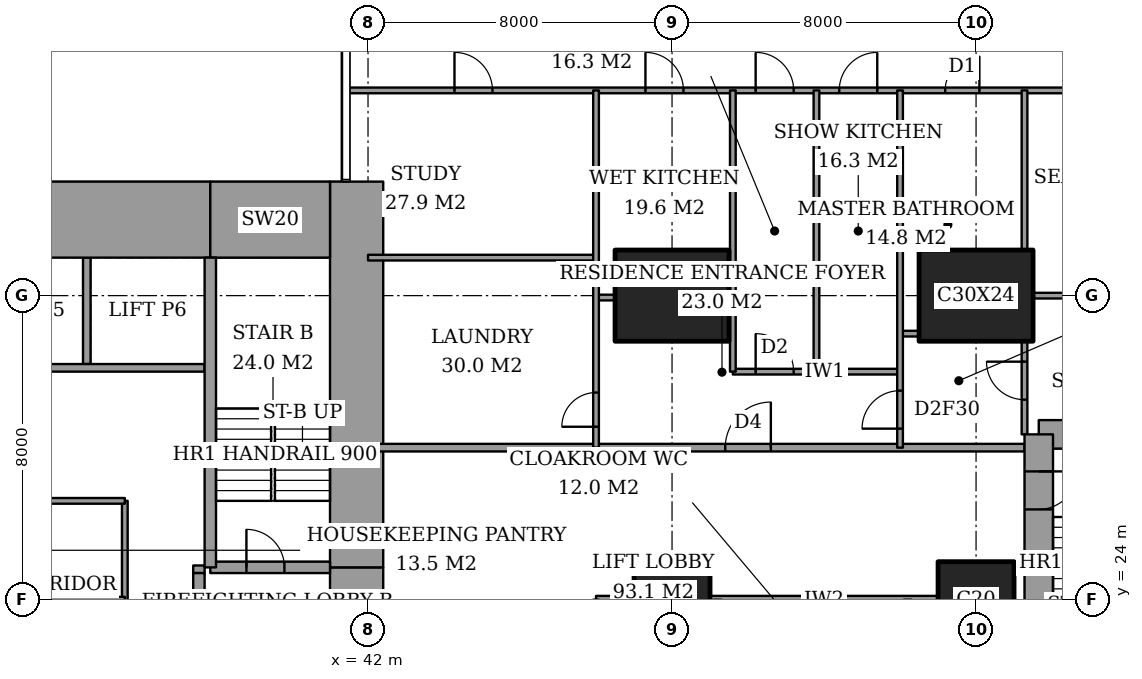
"""IFC4 building model, lengths in metres.
Left out: names, types, materials, properties, quantities, classifications, styles, units other than length and angle.
Written with IfcOpenShell. Run it as: python <this file> out.ifc"""

import sys

from ifc_helpers import new_model, si_unit, direction, frame, frame_2d, origin, origin_2d, place, context, subcontext, project, spatial, rectangle, extrude, element, fill, save


model = new_model("IFC4")
c1 = context("Model", 3, precision=1e-05, world=origin(), true_north=direction((0.0, 1.0)))
c2 = subcontext(c1, "Body", "Model", "MODEL_VIEW")
j1 = project(units=[si_unit("LENGTHUNIT", "METRE"), si_unit("PLANEANGLEUNIT", "RADIAN")], contexts=[c1])
p1 = place(None, origin())
s1 = spatial("IfcSite", under=j1, at=p1, CompositionType="ELEMENT")
p2 = place(p1, origin())
s2 = spatial("IfcBuilding", under=s1, at=p2, CompositionType="ELEMENT")
p3 = place(p2, frame((0.0, 0.0, 40.4)))
s3 = spatial("IfcBuildingStorey", under=s2, at=p3, CompositionType="ELEMENT", Elevation=40.4)
p4 = place(p3, frame((50.0, 24.0, 0.0), z_axis=(0.0, 0.0, 1.0), x_axis=(1.0, 0.0, 0.0)))
e1 = element("IfcColumn", 1, at=p4, inside=s3, PredefinedType="COLUMN", context=c2, shape_type="SweptSolid", body=[
    extrude(rectangle(XDim=2.0, YDim=2.0, at=origin_2d()), origin(), (0.0, 0.0, 1.0), 3.6),
])
p5 = place(p3, frame((50.0, 32.0, 0.0), z_axis=(0.0, 0.0, 1.0), x_axis=(1.0, 0.0, 0.0)))
e2 = element("IfcColumn", 2, at=p5, inside=s3, PredefinedType="COLUMN", context=c2, shape_type="SweptSolid", body=[
    extrude(rectangle(XDim=3.0, YDim=2.4, at=origin_2d()), origin(), (0.0, 0.0, 1.0), 3.6),
])
p6 = place(p3, frame((58.0, 24.0, 0.0), z_axis=(0.0, 0.0, 1.0), x_axis=(1.0, 0.0, 0.0)))
e3 = element("IfcColumn", 3, at=p6, inside=s3, PredefinedType="COLUMN", context=c2, shape_type="SweptSolid", body=[
    extrude(rectangle(XDim=2.0, YDim=2.0, at=origin_2d()), origin(), (0.0, 0.0, 1.0), 3.6),
])
p7 = place(p3, frame((58.0, 32.0, 0.0), z_axis=(0.0, 0.0, 1.0), x_axis=(1.0, 0.0, 0.0)))
e4 = element("IfcColumn", 4, at=p7, inside=s3, PredefinedType="COLUMN", context=c2, shape_type="SweptSolid", body=[
    extrude(rectangle(XDim=3.0, YDim=2.4, at=origin_2d()), origin(), (0.0, 0.0, 1.0), 3.6),
])
p8 = place(p3, frame((28.15, 34.0, 0.0), z_axis=(0.0, 0.0, 1.0), x_axis=(1.0, 0.0, 0.0)))
e5 = element("IfcWall", 5, at=p8, inside=s3, PredefinedType="SHEAR", context=c2, shape_type="SweptSolid", body=[
    extrude(rectangle(XDim=9.7, YDim=2.0, at=frame_2d((4.85, 0.0))), origin(), (0.0, 0.0, 1.0), 3.6),
])
p9 = place(p3, frame((37.85, 34.0, 0.0), z_axis=(0.0, 0.0, 1.0), x_axis=(1.0, 0.0, 0.0)))
e6 = element("IfcWall", 6, at=p9, inside=s3, PredefinedType="SHEAR", context=c2, shape_type="SweptSolid", body=[
    extrude(rectangle(XDim=3.15, YDim=2.0, at=frame_2d((1.575, 0.0))), origin(), (0.0, 0.0, 1.0), 3.6),
])
p10 = place(p3, frame((41.7, 13.0, 0.0), z_axis=(0.0, 0.0, 1.0), x_axis=(0.0, 1.0, 0.0)))
e7 = element("IfcWall", 7, at=p10, inside=s3, PredefinedType="SHEAR", context=c2, shape_type="SweptSolid", body=[
    extrude(rectangle(XDim=11.85, YDim=1.4, at=frame_2d((5.925, 0.0))), origin(), (0.0, 0.0, 1.0), 3.6),
])
p11 = place(p10, frame((7.5, 0.0, 0.0)))
e8 = element("IfcOpeningElement", 8, at=p11, cuts=e7, PredefinedType="OPENING", context=c2, shape_type="SweptSolid", body=[
    extrude(rectangle(XDim=1.8, YDim=2.4, at=frame_2d((0.9, 1.2))), frame((0.0, 0.71, 0.0), z_axis=(0.0, -1.0, 0.0), x_axis=(1.0, 0.0, 0.0)), (0.0, 0.0, 1.0), 1.42),
])
p12 = place(p3, frame((41.7, 24.85, 0.0), z_axis=(0.0, 0.0, 1.0), x_axis=(0.0, 1.0, 0.0)))
e9 = element("IfcWall", 9, at=p12, inside=s3, PredefinedType="SHEAR", context=c2, shape_type="SweptSolid", body=[
    extrude(rectangle(XDim=10.15, YDim=1.4, at=frame_2d((5.075, 0.0))), origin(), (0.0, 0.0, 1.0), 3.6),
])
p13 = place(p3, frame((37.85, 24.85, 0.0), z_axis=(0.0, 0.0, 1.0), x_axis=(0.0, 1.0, 0.0)))
e10 = element("IfcWall", 10, at=p13, inside=s3, PredefinedType="SHEAR", context=c2, shape_type="SweptSolid", body=[
    extrude(rectangle(XDim=8.15, YDim=0.3, at=frame_2d((4.075, 0.0))), origin(), (0.0, 0.0, 1.0), 3.6),
])
p14 = place(p3, frame((37.85, 24.85, 0.0), z_axis=(0.0, 0.0, 1.0), x_axis=(1.0, 0.0, 0.0)))
e11 = element("IfcWall", 11, at=p14, inside=s3, PredefinedType="SHEAR", context=c2, shape_type="SweptSolid", body=[
    extrude(rectangle(XDim=3.15, YDim=0.3, at=frame_2d((1.575, 0.0))), origin(), (0.0, 0.0, 1.0), 3.6),
])
p15 = place(p14, frame((0.95, 0.0, 0.0)))
e12 = element("IfcOpeningElement", 12, at=p15, cuts=e11, PredefinedType="OPENING", context=c2, shape_type="SweptSolid", body=[
    extrude(rectangle(XDim=1.0, YDim=2.1, at=frame_2d((0.5, 1.05))), frame((0.0, 0.16, 0.0), z_axis=(0.0, -1.0, 0.0), x_axis=(1.0, 0.0, 0.0)), (0.0, 0.0, 1.0), 0.32),
])
p16 = place(p3, frame((37.55, 18.0, 0.0), z_axis=(0.0, 0.0, 1.0), x_axis=(0.0, 1.0, 0.0)))
e13 = element("IfcWall", 13, at=p16, inside=s3, PredefinedType="PARTITIONING", context=c2, shape_type="SweptSolid", body=[
    extrude(rectangle(XDim=6.7, YDim=0.3, at=frame_2d((3.35, 0.0))), origin(), (0.0, 0.0, 1.0), 3.6),
])
p17 = place(p16, frame((2.8, 0.0, 0.0)))
e14 = element("IfcOpeningElement", 14, at=p17, cuts=e13, PredefinedType="OPENING", context=c2, shape_type="SweptSolid", body=[
    extrude(rectangle(XDim=1.2, YDim=2.1, at=frame_2d((0.6, 1.05))), frame((0.0, 0.16, 0.0), z_axis=(0.0, -1.0, 0.0), x_axis=(1.0, 0.0, 0.0)), (0.0, 0.0, 1.0), 0.32),
])
p18 = place(p3, frame((64.1, 28.35, 0.0), z_axis=(0.0, 0.0, 1.0), x_axis=(-1.0, 0.0, 0.0)))
e15 = element("IfcWall", 15, at=p18, inside=s3, PredefinedType="SHEAR", context=c2, shape_type="SweptSolid", body=[
    extrude(rectangle(XDim=4.45, YDim=0.75, at=frame_2d((2.225, 0.0))), origin(), (0.0, 0.0, 1.0), 3.6),
])
p19 = place(p3, frame((59.65, 28.35, 0.0), z_axis=(0.0, 0.0, 1.0), x_axis=(0.0, -1.0, 0.0)))
e16 = element("IfcWall", 16, at=p19, inside=s3, PredefinedType="SHEAR", context=c2, shape_type="SweptSolid", body=[
    extrude(rectangle(XDim=8.7, YDim=0.75, at=frame_2d((4.35, 0.0))), origin(), (0.0, 0.0, 1.0), 3.6),
])
p20 = place(p19, frame((0.975, 0.0, 0.0)))
e17 = element("IfcOpeningElement", 17, at=p20, cuts=e16, PredefinedType="OPENING", context=c2, shape_type="SweptSolid", body=[
    extrude(rectangle(XDim=1.0, YDim=2.1, at=frame_2d((0.5, 1.05))), frame((0.0, 0.385, 0.0), z_axis=(0.0, -1.0, 0.0), x_axis=(1.0, 0.0, 0.0)), (0.0, 0.0, 1.0), 0.77),
])
p21 = place(p3, frame((48.0, 24.0, 0.0), z_axis=(0.0, 0.0, 1.0), x_axis=(1.0, 0.0, 0.0)))
e18 = element("IfcWall", 18, at=p21, inside=s3, PredefinedType="PARTITIONING", context=c2, shape_type="SweptSolid", body=[
    extrude(rectangle(XDim=1.0, YDim=0.2, at=frame_2d((0.5, 0.0))), origin(), (0.0, 0.0, 1.0), 3.35),
])
p22 = place(p3, frame((51.0, 24.0, 0.0), z_axis=(0.0, 0.0, 1.0), x_axis=(1.0, 0.0, 0.0)))
e19 = element("IfcWall", 19, at=p22, inside=s3, PredefinedType="PARTITIONING", context=c2, shape_type="SweptSolid", body=[
    extrude(rectangle(XDim=6.0, YDim=0.2, at=frame_2d((3.0, 0.0))), origin(), (0.0, 0.0, 1.0), 3.35),
])
p23 = place(p3, frame((42.0, 28.0, 0.0), z_axis=(0.0, 0.0, 1.0), x_axis=(1.0, 0.0, 0.0)))
e20 = element("IfcWall", 20, at=p23, inside=s3, PredefinedType="PARTITIONING", context=c2, shape_type="SweptSolid", body=[
    extrude(rectangle(XDim=17.275, YDim=0.2, at=frame_2d((8.637, 0.0))), origin(), (0.0, 0.0, 1.0), 3.35),
])
p24 = place(p23, frame((9.4, 0.0, 0.0)))
e21 = element("IfcOpeningElement", 21, at=p24, cuts=e20, PredefinedType="OPENING", context=c2, shape_type="SweptSolid", body=[
    extrude(rectangle(XDim=1.2, YDim=2.4, at=frame_2d((0.6, 1.2))), frame((0.0, 0.11, 0.0), z_axis=(0.0, -1.0, 0.0), x_axis=(1.0, 0.0, 0.0)), (0.0, 0.0, 1.0), 0.22),
])
p25 = place(p3, frame((51.6, 30.0, 0.0), z_axis=(0.0, 0.0, 1.0), x_axis=(1.0, 0.0, 0.0)))
e22 = element("IfcWall", 22, at=p25, inside=s3, PredefinedType="PARTITIONING", context=c2, shape_type="SweptSolid", body=[
    extrude(rectangle(XDim=4.4, YDim=0.15, at=frame_2d((2.2, 0.0))), origin(), (0.0, 0.0, 1.0), 3.35),
])
p26 = place(p25, frame((0.6, 0.0, 0.0)))
e23 = element("IfcOpeningElement", 23, at=p26, cuts=e22, PredefinedType="OPENING", context=c2, shape_type="SweptSolid", body=[
    extrude(rectangle(XDim=1.0, YDim=2.1, at=frame_2d((0.5, 1.05))), frame((0.0, 0.085, 0.0), z_axis=(0.0, -1.0, 0.0), x_axis=(1.0, 0.0, 0.0)), (0.0, 0.0, 1.0), 0.17),
])
p27 = place(p3, frame((56.0, 31.0, 0.0), z_axis=(0.0, 0.0, 1.0), x_axis=(1.0, 0.0, 0.0)))
e24 = element("IfcWall", 24, at=p27, inside=s3, PredefinedType="PARTITIONING", context=c2, shape_type="SweptSolid", body=[
    extrude(rectangle(XDim=0.5, YDim=0.15, at=frame_2d((0.25, 0.0))), origin(), (0.0, 0.0, 1.0), 3.35),
])
p28 = place(p3, frame((48.0, 31.95, 0.0), z_axis=(0.0, 0.0, 1.0), x_axis=(1.0, 0.0, 0.0)))
e25 = element("IfcWall", 25, at=p28, inside=s3, PredefinedType="PARTITIONING", context=c2, shape_type="SweptSolid", body=[
    extrude(rectangle(XDim=0.5, YDim=0.15, at=frame_2d((0.25, 0.0))), origin(), (0.0, 0.0, 1.0), 2.634),
])
p29 = place(p3, frame((59.5, 32.0, 0.0), z_axis=(0.0, 0.0, 1.0), x_axis=(1.0, 0.0, 0.0)))
e26 = element("IfcWall", 26, at=p29, inside=s3, PredefinedType="PARTITIONING", context=c2, shape_type="SweptSolid", body=[
    extrude(rectangle(XDim=5.15, YDim=0.15, at=frame_2d((2.575, 0.0))), origin(), (0.0, 0.0, 1.0), 2.634),
])
p30 = place(p3, frame((42.0, 33.0, 0.0), z_axis=(0.0, 0.0, 1.0), x_axis=(1.0, 0.0, 0.0)))
e27 = element("IfcWall", 27, at=p30, inside=s3, PredefinedType="PARTITIONING", context=c2, shape_type="SweptSolid", body=[
    extrude(rectangle(XDim=6.0, YDim=0.15, at=frame_2d((3.0, 0.0))), origin(), (0.0, 0.0, 1.0), 3.35),
])
p31 = place(p3, frame((41.439, 37.4, 0.0), z_axis=(0.0, 0.0, 1.0), x_axis=(1.0, 0.0, 0.0)))
e28 = element("IfcWall", 28, at=p31, inside=s3, PredefinedType="PARTITIONING", context=c2, shape_type="SweptSolid", body=[
    extrude(rectangle(XDim=25.011, YDim=0.15, at=frame_2d((12.505, 0.0))), origin(), (0.0, 0.0, 1.0), 3.35),
])
p32 = place(p31, frame((10.761, 0.0, 0.0)))
e29 = element("IfcOpeningElement", 29, at=p32, cuts=e28, PredefinedType="OPENING", context=c2, shape_type="SweptSolid", body=[
    extrude(rectangle(XDim=1.0, YDim=2.1, at=frame_2d((0.5, 1.05))), frame((0.0, 0.085, 0.0), z_axis=(0.0, -1.0, 0.0), x_axis=(1.0, 0.0, 0.0)), (0.0, 0.0, 1.0), 0.17),
])
p33 = place(p31, frame((20.924, 0.0, 0.0)))
e30 = element("IfcOpeningElement", 30, at=p33, cuts=e28, PredefinedType="OPENING", context=c2, shape_type="SweptSolid", body=[
    extrude(rectangle(XDim=1.0, YDim=2.1, at=frame_2d((0.5, 1.05))), frame((0.0, 0.085, 0.0), z_axis=(0.0, -1.0, 0.0), x_axis=(1.0, 0.0, 0.0)), (0.0, 0.0, 1.0), 0.17),
])
p34 = place(p31, frame((15.749, 0.0, 0.0)))
e31 = element("IfcOpeningElement", 31, at=p34, cuts=e28, PredefinedType="OPENING", context=c2, shape_type="SweptSolid", body=[
    extrude(rectangle(XDim=0.9, YDim=2.1, at=frame_2d((0.45, 1.05))), frame((0.0, 0.085, 0.0), z_axis=(0.0, -1.0, 0.0), x_axis=(1.0, 0.0, 0.0)), (0.0, 0.0, 1.0), 0.17),
])
p35 = place(p31, frame((12.961, 0.0, 0.0)))
e32 = element("IfcOpeningElement", 32, at=p35, cuts=e28, PredefinedType="OPENING", context=c2, shape_type="SweptSolid", body=[
    extrude(rectangle(XDim=1.0, YDim=2.1, at=frame_2d((0.5, 1.05))), frame((0.0, 0.085, 0.0), z_axis=(0.0, -1.0, 0.0), x_axis=(1.0, 0.0, 0.0)), (0.0, 0.0, 1.0), 0.17),
])
p36 = place(p31, frame((7.861, 0.0, 0.0)))
e33 = element("IfcOpeningElement", 33, at=p36, cuts=e28, PredefinedType="OPENING", context=c2, shape_type="SweptSolid", body=[
    extrude(rectangle(XDim=1.0, YDim=2.1, at=frame_2d((0.5, 1.05))), frame((0.0, 0.085, 0.0), z_axis=(0.0, -1.0, 0.0), x_axis=(1.0, 0.0, 0.0)), (0.0, 0.0, 1.0), 0.17),
])
p37 = place(p31, frame((2.836, 0.0, 0.0)))
e34 = element("IfcOpeningElement", 34, at=p37, cuts=e28, PredefinedType="OPENING", context=c2, shape_type="SweptSolid", body=[
    extrude(rectangle(XDim=1.0, YDim=2.1, at=frame_2d((0.5, 1.05))), frame((0.0, 0.085, 0.0), z_axis=(0.0, -1.0, 0.0), x_axis=(1.0, 0.0, 0.0)), (0.0, 0.0, 1.0), 0.17),
])
p38 = place(p3, frame((48.0, 28.0, 0.0), z_axis=(0.0, 0.0, 1.0), x_axis=(0.0, 1.0, 0.0)))
e35 = element("IfcWall", 35, at=p38, inside=s3, PredefinedType="PARTITIONING", context=c2, shape_type="SweptSolid", body=[
    extrude(rectangle(XDim=9.4, YDim=0.15, at=frame_2d((4.7, 0.0))), origin(), (0.0, 0.0, 1.0), 3.35),
])
p39 = place(p38, frame((0.55, 0.0, 0.0)))
e36 = element("IfcOpeningElement", 36, at=p39, cuts=e35, PredefinedType="OPENING", context=c2, shape_type="SweptSolid", body=[
    extrude(rectangle(XDim=0.9, YDim=2.1, at=frame_2d((0.45, 1.05))), frame((0.0, 0.085, 0.0), z_axis=(0.0, -1.0, 0.0), x_axis=(1.0, 0.0, 0.0)), (0.0, 0.0, 1.0), 0.17),
])
for number, where, z_axis, x_axis in (
    (37, (51.6, 30.0, 0.0), (0.0, 0.0, 1.0), (0.0, 1.0, 0.0)),
    (38, (53.8, 30.0, 0.0), (0.0, 0.0, 1.0), (0.0, 1.0, 0.0)),
):
    element("IfcWall", number, at=place(p3, frame(where, z_axis=z_axis, x_axis=x_axis)), inside=s3, PredefinedType="PARTITIONING", context=c2, shape_type="SweptSolid", body=[
        extrude(rectangle(XDim=7.4, YDim=0.15, at=frame_2d((3.7, 0.0))), origin(), (0.0, 0.0, 1.0), 3.35),
    ])
p40 = place(p3, frame((56.0, 28.0, 0.0), z_axis=(0.0, 0.0, 1.0), x_axis=(0.0, 1.0, 0.0)))
e39 = element("IfcWall", 39, at=p40, inside=s3, PredefinedType="PARTITIONING", context=c2, shape_type="SweptSolid", body=[
    extrude(rectangle(XDim=9.4, YDim=0.15, at=frame_2d((4.7, 0.0))), origin(), (0.0, 0.0, 1.0), 3.35),
])
p41 = place(p40, frame((0.5, 0.0, 0.0)))
e40 = element("IfcOpeningElement", 40, at=p41, cuts=e39, PredefinedType="OPENING", context=c2, shape_type="SweptSolid", body=[
    extrude(rectangle(XDim=1.0, YDim=2.1, at=frame_2d((0.5, 1.05))), frame((0.0, 0.085, 0.0), z_axis=(0.0, -1.0, 0.0), x_axis=(1.0, 0.0, 0.0)), (0.0, 0.0, 1.0), 0.17),
])
p42 = place(p3, frame((59.275, 28.35, 0.0), z_axis=(0.0, 0.0, 1.0), x_axis=(0.0, 1.0, 0.0)))
e41 = element("IfcWall", 41, at=p42, inside=s3, PredefinedType="PARTITIONING", context=c2, shape_type="SweptSolid", body=[
    extrude(rectangle(XDim=2.45, YDim=0.15, at=frame_2d((1.225, 0.0))), origin(), (0.0, 0.0, 1.0), 3.35),
])
p43 = place(p42, frame((0.913, 0.0, 0.0)))
e42 = element("IfcOpeningElement", 42, at=p43, cuts=e41, PredefinedType="OPENING", context=c2, shape_type="SweptSolid", body=[
    extrude(rectangle(XDim=1.0, YDim=2.1, at=frame_2d((0.5, 1.05))), frame((0.0, 0.085, 0.0), z_axis=(0.0, -1.0, 0.0), x_axis=(1.0, 0.0, 0.0)), (0.0, 0.0, 1.0), 0.17),
])
p44 = place(p3, frame((59.275, 33.2, 0.0), z_axis=(0.0, 0.0, 1.0), x_axis=(0.0, 1.0, 0.0)))
e43 = element("IfcWall", 43, at=p44, inside=s3, PredefinedType="PARTITIONING", context=c2, shape_type="SweptSolid", body=[
    extrude(rectangle(XDim=4.2, YDim=0.15, at=frame_2d((2.1, 0.0))), origin(), (0.0, 0.0, 1.0), 3.35),
])
p45 = place(p3, frame((25.0, 30.1, 0.0), z_axis=(0.0, 0.0, 1.0), x_axis=(1.0, 0.0, 0.0)))
e44 = element("IfcWall", 44, at=p45, inside=s3, PredefinedType="PARTITIONING", context=c2, shape_type="SweptSolid", body=[
    extrude(rectangle(XDim=12.7, YDim=0.2, at=frame_2d((6.35, 0.0))), origin(), (0.0, 0.0, 1.0), 3.6),
])
p46 = place(p45, frame((0.9, 0.0, 0.0)))
e45 = element("IfcOpeningElement", 45, at=p46, cuts=e44, PredefinedType="OPENING", context=c2, shape_type="SweptSolid", body=[
    extrude(rectangle(XDim=1.2, YDim=2.1, at=frame_2d((0.6, 1.05))), frame((0.0, 0.11, 0.0), z_axis=(0.0, -1.0, 0.0), x_axis=(1.0, 0.0, 0.0)), (0.0, 0.0, 1.0), 0.22),
])
p47 = place(p3, frame((34.6, 30.2, 0.0), z_axis=(0.0, 0.0, 1.0), x_axis=(0.0, 1.0, 0.0)))
e46 = element("IfcWall", 46, at=p47, inside=s3, PredefinedType="PARTITIONING", context=c2, shape_type="SweptSolid", body=[
    extrude(rectangle(XDim=2.8, YDim=0.2, at=frame_2d((1.4, 0.0))), origin(), (0.0, 0.0, 1.0), 3.6),
])
p48 = place(p3, frame((37.4, 24.8, 0.0), z_axis=(0.0, 0.0, 1.0), x_axis=(1.0, 0.0, 0.0)))
e47 = element("IfcWall", 47, at=p48, inside=s3, PredefinedType="PARTITIONING", context=c2, shape_type="SweptSolid", body=[
    extrude(rectangle(XDim=0.3, YDim=0.2, at=frame_2d((0.15, 0.0))), origin(), (0.0, 0.0, 1.0), 3.6),
])
p49 = place(p3, frame((30.4, 26.6, 0.0), z_axis=(0.0, 0.0, 1.0), x_axis=(1.0, 0.0, 0.0)))
e48 = element("IfcWall", 48, at=p49, inside=s3, PredefinedType="PARTITIONING", context=c2, shape_type="SweptSolid", body=[
    extrude(rectangle(XDim=5.2, YDim=0.15, at=frame_2d((2.6, 0.0))), origin(), (0.0, 0.0, 1.0), 3.35),
])
p50 = place(p49, frame((2.15, 0.0, 0.0)))
e49 = element("IfcOpeningElement", 49, at=p50, cuts=e48, PredefinedType="OPENING", context=c2, shape_type="SweptSolid", body=[
    extrude(rectangle(XDim=0.9, YDim=2.1, at=frame_2d((0.45, 1.05))), frame((0.0, 0.085, 0.0), z_axis=(0.0, -1.0, 0.0), x_axis=(1.0, 0.0, 0.0)), (0.0, 0.0, 1.0), 0.17),
])
for number, where, z_axis, x_axis in (
    (50, (35.6, 21.4, 0.0), (0.0, 0.0, 1.0), (0.0, 1.0, 0.0)),
    (51, (30.4, 24.0, 0.0), (0.0, 0.0, 1.0), (1.0, 0.0, 0.0)),
):
    element("IfcWall", number, at=place(p3, frame(where, z_axis=z_axis, x_axis=x_axis)), inside=s3, PredefinedType="PARTITIONING", context=c2, shape_type="SweptSolid", body=[
        extrude(rectangle(XDim=5.2, YDim=0.15, at=frame_2d((2.6, 0.0))), origin(), (0.0, 0.0, 1.0), 3.35),
    ])
p51 = place(p32, origin())
e52 = element("IfcDoor", 52, at=p51, inside=s3, OperationType="SINGLE_SWING_RIGHT", PredefinedType="DOOR", context=c2, shape_type="SweptSolid", body=[
    extrude(rectangle(XDim=1.0, YDim=2.1, at=frame_2d((0.5, 1.05))), frame((0.0, 0.025, 0.0), z_axis=(0.0, -1.0, 0.0), x_axis=(1.0, 0.0, 0.0)), (0.0, 0.0, 1.0), 0.05),
])
fill(e29, e52)
p52 = place(p43, origin())
e53 = element("IfcDoor", 53, at=p52, inside=s3, OperationType="SINGLE_SWING_LEFT", PredefinedType="DOOR", context=c2, shape_type="SweptSolid", body=[
    extrude(rectangle(XDim=1.0, YDim=2.1, at=frame_2d((0.5, 1.05))), frame((0.0, 0.025, 0.0), z_axis=(0.0, -1.0, 0.0), x_axis=(1.0, 0.0, 0.0)), (0.0, 0.0, 1.0), 0.05),
])
fill(e42, e53)
p53 = place(p34, origin())
e54 = element("IfcDoor", 54, at=p53, inside=s3, OperationType="SINGLE_SWING_LEFT", PredefinedType="DOOR", context=c2, shape_type="SweptSolid", body=[
    extrude(rectangle(XDim=0.9, YDim=2.1, at=frame_2d((0.45, 1.05))), frame((0.0, 0.025, 0.0), z_axis=(0.0, -1.0, 0.0), x_axis=(1.0, 0.0, 0.0)), (0.0, 0.0, 1.0), 0.05),
])
fill(e31, e54)
p54 = place(p41, origin())
e55 = element("IfcDoor", 55, at=p54, inside=s3, OperationType="SINGLE_SWING_RIGHT", PredefinedType="DOOR", context=c2, shape_type="SweptSolid", body=[
    extrude(rectangle(XDim=1.0, YDim=2.1, at=frame_2d((0.5, 1.05))), frame((0.0, 0.025, 0.0), z_axis=(0.0, -1.0, 0.0), x_axis=(1.0, 0.0, 0.0)), (0.0, 0.0, 1.0), 0.05),
])
fill(e40, e55)
p55 = place(p24, origin())
e56 = element("IfcDoor", 56, at=p55, inside=s3, OperationType="SINGLE_SWING_LEFT", PredefinedType="DOOR", context=c2, shape_type="SweptSolid", body=[
    extrude(rectangle(XDim=1.2, YDim=2.4, at=frame_2d((0.6, 1.2))), frame((0.0, 0.025, 0.0), z_axis=(0.0, -1.0, 0.0), x_axis=(1.0, 0.0, 0.0)), (0.0, 0.0, 1.0), 0.05),
])
fill(e21, e56)
p56 = place(p35, origin())
e57 = element("IfcDoor", 57, at=p56, inside=s3, OperationType="SINGLE_SWING_LEFT", PredefinedType="DOOR", context=c2, shape_type="SweptSolid", body=[
    extrude(rectangle(XDim=1.0, YDim=2.1, at=frame_2d((0.5, 1.05))), frame((0.0, 0.025, 0.0), z_axis=(0.0, -1.0, 0.0), x_axis=(1.0, 0.0, 0.0)), (0.0, 0.0, 1.0), 0.05),
])
fill(e32, e57)
p57 = place(p26, origin())
e58 = element("IfcDoor", 58, at=p57, inside=s3, OperationType="SINGLE_SWING_RIGHT", PredefinedType="DOOR", context=c2, shape_type="SweptSolid", body=[
    extrude(rectangle(XDim=1.0, YDim=2.1, at=frame_2d((0.5, 1.05))), frame((0.0, 0.025, 0.0), z_axis=(0.0, -1.0, 0.0), x_axis=(1.0, 0.0, 0.0)), (0.0, 0.0, 1.0), 0.05),
])
fill(e23, e58)
p58 = place(p36, origin())
e59 = element("IfcDoor", 59, at=p58, inside=s3, OperationType="SINGLE_SWING_RIGHT", PredefinedType="DOOR", context=c2, shape_type="SweptSolid", body=[
    extrude(rectangle(XDim=1.0, YDim=2.1, at=frame_2d((0.5, 1.05))), frame((0.0, 0.025, 0.0), z_axis=(0.0, -1.0, 0.0), x_axis=(1.0, 0.0, 0.0)), (0.0, 0.0, 1.0), 0.05),
])
fill(e33, e59)
p59 = place(p37, origin())
e60 = element("IfcDoor", 60, at=p59, inside=s3, OperationType="SINGLE_SWING_RIGHT", PredefinedType="DOOR", context=c2, shape_type="SweptSolid", body=[
    extrude(rectangle(XDim=1.0, YDim=2.1, at=frame_2d((0.5, 1.05))), frame((0.0, 0.025, 0.0), z_axis=(0.0, -1.0, 0.0), x_axis=(1.0, 0.0, 0.0)), (0.0, 0.0, 1.0), 0.05),
])
fill(e34, e60)
p60 = place(p39, origin())
e61 = element("IfcDoor", 61, at=p60, inside=s3, OperationType="SINGLE_SWING_RIGHT", PredefinedType="DOOR", context=c2, shape_type="SweptSolid", body=[
    extrude(rectangle(XDim=0.9, YDim=2.1, at=frame_2d((0.45, 1.05))), frame((0.0, 0.025, 0.0), z_axis=(0.0, -1.0, 0.0), x_axis=(1.0, 0.0, 0.0)), (0.0, 0.0, 1.0), 0.05),
])
fill(e36, e61)
p61 = place(p15, origin())
e62 = element("IfcDoor", 62, at=p61, inside=s3, OperationType="SINGLE_SWING_RIGHT", PredefinedType="DOOR", context=c2, shape_type="SweptSolid", body=[
    extrude(rectangle(XDim=1.0, YDim=2.1, at=frame_2d((0.5, 1.05))), frame((0.0, 0.025, 0.0), z_axis=(0.0, -1.0, 0.0), x_axis=(1.0, 0.0, 0.0)), (0.0, 0.0, 1.0), 0.05),
])
fill(e12, e62)
p62 = place(p20, origin())
e63 = element("IfcDoor", 63, at=p62, inside=s3, OperationType="SINGLE_SWING_RIGHT", PredefinedType="DOOR", context=c2, shape_type="SweptSolid", body=[
    extrude(rectangle(XDim=1.0, YDim=2.1, at=frame_2d((0.5, 1.05))), frame((0.0, 0.025, 0.0), z_axis=(0.0, -1.0, 0.0), x_axis=(1.0, 0.0, 0.0)), (0.0, 0.0, 1.0), 0.05),
])
fill(e17, e63)
save(model, sys.argv[1])
